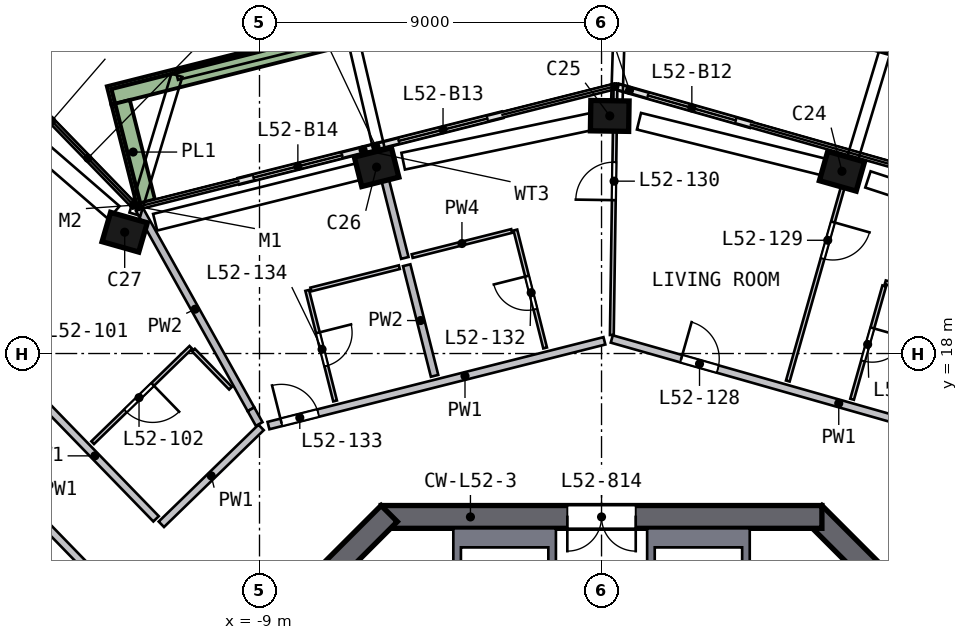
"""IFC4 building model, lengths in metres.
Left out: names, types, materials, properties, quantities, classifications, styles, units other than length and angle.
Written with IfcOpenShell. Run it as: python <this file> out.ifc"""

import sys

from ifc_helpers import new_model, si_unit, direction, frame, frame_2d, origin, origin_2d, place, context, subcontext, project, spatial, polyline, rectangle, outline, extrude, element, fill, save


model = new_model("IFC4")
c1 = context("Model", 3, precision=1e-05, world=origin(), true_north=direction((0.0, 1.0)))
c2 = subcontext(c1, "Body", "Model", "MODEL_VIEW")
j1 = project(units=[si_unit("LENGTHUNIT", "METRE"), si_unit("PLANEANGLEUNIT", "RADIAN")], contexts=[c1])
p1 = place(None, origin())
s1 = spatial("IfcSite", under=j1, at=p1, CompositionType="ELEMENT")
p2 = place(p1, origin())
s2 = spatial("IfcBuilding", under=s1, at=p2, CompositionType="ELEMENT")
p3 = place(p2, frame((0.0, 0.0, 212.5)))
s3 = spatial("IfcBuildingStorey", under=s2, at=p3, CompositionType="ELEMENT", Elevation=212.5)
p4 = place(p3, frame((6.458, 22.76, 0.0), z_axis=(-0.108518363, 0.029838507, 0.993646531), x_axis=(-0.955819005, 0.271559126, -0.112541864)))
e1 = element("IfcColumn", 1, at=p4, inside=s3, PredefinedType="COLUMN", context=c2, shape_type="SweptSolid", body=[
    extrude(rectangle(XDim=1.0, YDim=0.8, at=origin_2d()), origin(), (0.0, 0.0, 1.0), 3.019),
])
p5 = place(p3, frame((0.356, 24.252, 0.0), z_axis=(-0.115354293, 0.000727532, 0.993324145), x_axis=(0.993215879, -0.014697649, 0.115352485)))
e2 = element("IfcColumn", 2, at=p5, inside=s3, PredefinedType="COLUMN", context=c2, shape_type="SweptSolid", body=[
    extrude(rectangle(XDim=1.0, YDim=0.8, at=origin_2d()), origin(), (0.0, 0.0, 1.0), 3.02),
])
p6 = place(p3, frame((-5.788, 22.939, 0.0), z_axis=(-0.108842351, -0.028463973, 0.99365142), x_axis=(-0.96342149, -0.243234613, -0.112498691)))
e3 = element("IfcColumn", 3, at=p6, inside=s3, PredefinedType="COLUMN", context=c2, shape_type="SweptSolid", body=[
    extrude(rectangle(XDim=1.0, YDim=0.8, at=origin_2d()), origin(), (0.0, 0.0, 1.0), 3.019),
])
p7 = place(p3, frame((-12.426, 21.265, 0.0), z_axis=(-0.100621363, -0.059887895, 0.993120728), x_axis=(0.956942549, -0.278998029, 0.080131505)))
e4 = element("IfcColumn", 4, at=p7, inside=s3, PredefinedType="COLUMN", context=c2, shape_type="SweptSolid", body=[
    extrude(rectangle(XDim=1.0, YDim=0.8, at=origin_2d()), origin(), (0.0, 0.0, 1.0), 3.021),
])
p8 = place(p3, frame((13.788, 5.587, 0.0), z_axis=(0.0, 0.0, 1.0), x_axis=(-0.707106781, 0.707106781, 0.0)))
e5 = element("IfcWall", 5, at=p8, inside=s3, PredefinedType="SHEAR", context=c2, shape_type="SweptSolid", body=[
    extrude(rectangle(XDim=11.598, YDim=0.6, at=frame_2d((5.799, 0.0))), origin(), (0.0, 0.0, 1.0), 3.5),
])
p9 = place(p8, frame((2.099, 0.0, 0.0)))
e6 = element("IfcOpeningElement", 6, at=p9, cuts=e5, PredefinedType="OPENING", context=c2, shape_type="SweptSolid", body=[
    extrude(rectangle(XDim=1.2, YDim=2.1, at=frame_2d((0.6, 1.05))), frame((0.0, 0.31, 0.0), z_axis=(0.0, -1.0, 0.0), x_axis=(1.0, 0.0, 0.0)), (0.0, 0.0, 1.0), 0.62),
])
p10 = place(p3, frame((5.799, 13.7, 0.0), z_axis=(0.0, 0.0, 1.0), x_axis=(-1.0, 0.0, 0.0)))
e7 = element("IfcWall", 7, at=p10, inside=s3, PredefinedType="SHEAR", context=c2, shape_type="SweptSolid", body=[
    extrude(rectangle(XDim=11.598, YDim=0.6, at=frame_2d((5.799, 0.0))), origin(), (0.0, 0.0, 1.0), 3.5),
])
p11 = place(p10, frame((4.899, 0.0, 0.0)))
e8 = element("IfcOpeningElement", 8, at=p11, cuts=e7, PredefinedType="OPENING", context=c2, shape_type="SweptSolid", body=[
    extrude(rectangle(XDim=1.8, YDim=2.1, at=frame_2d((0.9, 1.05))), frame((0.0, 0.31, 0.0), z_axis=(0.0, -1.0, 0.0), x_axis=(1.0, 0.0, 0.0)), (0.0, 0.0, 1.0), 0.62),
])
p12 = place(p3, frame((-5.587, 13.788, 0.0), z_axis=(0.0, 0.0, 1.0), x_axis=(-0.707106781, -0.707106781, 0.0)))
e9 = element("IfcWall", 9, at=p12, inside=s3, PredefinedType="SHEAR", context=c2, shape_type="SweptSolid", body=[
    extrude(rectangle(XDim=11.598, YDim=0.6, at=frame_2d((5.799, 0.0))), origin(), (0.0, 0.0, 1.0), 3.5),
])
p13 = place(p3, frame((3.916, 24.027, 0.0), z_axis=(0.0, 0.0, 1.0), x_axis=(-0.96202019, 0.272978303, 0.0)))
e10 = element("IfcWall", 10, at=p13, inside=s3, PredefinedType="SOLIDWALL", context=c2, shape_type="SweptSolid", body=[
    extrude(rectangle(XDim=3.609, YDim=0.15, at=frame_2d((1.804, 0.0))), origin(), (0.0, 0.0, 1.0), 2.935),
])
p14 = place(p13, frame((0.4, 0.0, 0.0)))
e11 = element("IfcOpeningElement", 11, at=p14, cuts=e10, PredefinedType="OPENING", context=c2, shape_type="SweptSolid", body=[
    extrude(rectangle(XDim=2.4, YDim=2.4, at=frame_2d((1.2, 1.2))), frame((0.0, 0.085, 0.0), z_axis=(0.0, -1.0, 0.0), x_axis=(1.0, 0.0, 0.0)), (0.0, 0.0, 1.0), 0.17),
])
p15 = place(p3, frame((-2.619, 24.28, 0.0), z_axis=(0.0, 0.0, 1.0), x_axis=(-0.969612207, -0.244647026, 0.0)))
e12 = element("IfcWall", 12, at=p15, inside=s3, PredefinedType="SOLIDWALL", context=c2, shape_type="SweptSolid", body=[
    extrude(rectangle(XDim=3.4, YDim=0.15, at=frame_2d((1.7, 0.0))), origin(), (0.0, 0.0, 1.0), 2.935),
])
p16 = place(p15, frame((0.4, 0.0, 0.0)))
e13 = element("IfcOpeningElement", 13, at=p16, cuts=e12, PredefinedType="OPENING", context=c2, shape_type="SweptSolid", body=[
    extrude(rectangle(XDim=2.4, YDim=2.4, at=frame_2d((1.2, 1.2))), frame((0.0, 0.085, 0.0), z_axis=(0.0, -1.0, 0.0), x_axis=(1.0, 0.0, 0.0)), (0.0, 0.0, 1.0), 0.17),
])
p17 = place(p3, frame((-5.916, 23.448, 0.0), z_axis=(0.0, 0.0, 1.0), x_axis=(-0.969617968, -0.244624194, 0.0)))
e14 = element("IfcWall", 14, at=p17, inside=s3, PredefinedType="SOLIDWALL", context=c2, shape_type="SweptSolid", body=[
    extrude(rectangle(XDim=3.74, YDim=0.15, at=frame_2d((1.87, 0.0))), origin(), (0.0, 0.0, 1.0), 2.935),
])
p18 = place(p17, frame((0.94, 0.0, 0.0)))
e15 = element("IfcOpeningElement", 15, at=p18, cuts=e14, PredefinedType="OPENING", context=c2, shape_type="SweptSolid", body=[
    extrude(rectangle(XDim=2.4, YDim=2.4, at=frame_2d((1.2, 1.2))), frame((0.0, 0.085, 0.0), z_axis=(0.0, -1.0, 0.0), x_axis=(1.0, 0.0, 0.0)), (0.0, 0.0, 1.0), 0.17),
])
p19 = place(p3, frame((13.199, 24.537, 0.0), z_axis=(0.0, 0.0, 1.0), x_axis=(-0.962028122, 0.272950348, 0.0)))
e16 = element("IfcWall", 16, at=p19, inside=s3, PredefinedType="SOLIDWALL", context=c2, shape_type="SweptSolid", body=[
    extrude(rectangle(XDim=13.224, YDim=0.5, at=frame_2d((6.612, 0.0))), origin(), (0.0, 0.0, 1.0), 0.7),
])
p20 = place(p3, frame((0.348, 28.149, 0.0), z_axis=(0.0, 0.0, 1.0), x_axis=(-0.969615948, -0.244632202, 0.0)))
e17 = element("IfcWall", 17, at=p20, inside=s3, PredefinedType="SOLIDWALL", context=c2, shape_type="SweptSolid", body=[
    extrude(rectangle(XDim=13.723, YDim=0.5, at=frame_2d((6.862, 0.0))), origin(), (0.0, 0.0, 1.0), 0.7),
])
p21 = place(p3, frame((-12.655, 24.61, 0.0), z_axis=(0.0, 0.0, 1.0), x_axis=(0.244684701, -0.969602701, 0.0)))
e18 = element("IfcWall", 18, at=p21, inside=s3, PredefinedType="SOLIDWALL", context=c2, shape_type="SweptSolid", body=[
    extrude(rectangle(XDim=2.699, YDim=0.5, at=frame_2d((1.35, 0.0))), origin(), (0.0, 0.0, 1.0), 0.7),
])
p22 = place(p3, origin())
e19 = element("IfcWall", 19, at=p22, inside=s3, PredefinedType="SOLIDWALL", context=c2, shape_type="SweptSolid", body=[
    extrude(outline(polyline([(3.9, 9.9), (3.7, 9.9), (3.7, 12.9), (1.4, 12.9), (1.4, 9.9), (1.2, 9.9), (1.2, 13.4), (3.9, 13.4), (3.9, 9.9)])), origin(), (0.0, 0.0, 1.0), 3.0),
])
p23 = place(p3, origin())
e20 = element("IfcWall", 20, at=p23, inside=s3, PredefinedType="SOLIDWALL", context=c2, shape_type="SweptSolid", body=[
    extrude(outline(polyline([(-3.9, 13.4), (-1.2, 13.4), (-1.2, 9.9), (-1.4, 9.9), (-1.4, 12.9), (-3.7, 12.9), (-3.7, 9.9), (-3.9, 9.9), (-3.9, 13.4)])), origin(), (0.0, 0.0, 1.0), 3.0),
])
p24 = place(p3, frame((-13.3, 12.117, 0.0), z_axis=(0.0, 0.0, 1.0), x_axis=(-0.696664352, 0.717397226, 0.0)))
e21 = element("IfcWall", 21, at=p24, inside=s3, PredefinedType="SOLIDWALL", context=c2, shape_type="SweptSolid", body=[
    extrude(rectangle(XDim=9.821, YDim=0.2, at=frame_2d((4.91, 0.0))), origin(), (0.0, 0.0, 1.0), 3.0),
])
p25 = place(p24, frame((4.8, 0.0, 0.0)))
e22 = element("IfcOpeningElement", 22, at=p25, cuts=e21, PredefinedType="OPENING", context=c2, shape_type="SweptSolid", body=[
    extrude(rectangle(XDim=1.0, YDim=2.1, at=frame_2d((0.5, 1.05))), frame((0.0, 0.11, 0.0), z_axis=(0.0, -1.0, 0.0), x_axis=(1.0, 0.0, 0.0)), (0.0, 0.0, 1.0), 0.22),
])
p26 = place(p3, frame((-18.563, 20.695, 0.0), z_axis=(0.0, 0.0, 1.0), x_axis=(0.696664352, -0.717397226, 0.0)))
e23 = element("IfcWall", 23, at=p26, inside=s3, PredefinedType="SOLIDWALL", context=c2, shape_type="SweptSolid", body=[
    extrude(rectangle(XDim=9.821, YDim=0.2, at=frame_2d((4.91, 0.0))), origin(), (0.0, 0.0, 1.0), 3.0),
])
p27 = place(p26, frame((4.0, 0.0, 0.0)))
e24 = element("IfcOpeningElement", 24, at=p27, cuts=e23, PredefinedType="OPENING", context=c2, shape_type="SweptSolid", body=[
    extrude(rectangle(XDim=1.0, YDim=2.1, at=frame_2d((0.5, 1.05))), frame((0.0, 0.11, 0.0), z_axis=(0.0, -1.0, 0.0), x_axis=(1.0, 0.0, 0.0)), (0.0, 0.0, 1.0), 0.22),
])
p28 = place(p3, frame((-8.958, 16.055, 0.0), z_axis=(0.0, 0.0, 1.0), x_axis=(-0.717408019, -0.696653238, 0.0)))
e25 = element("IfcWall", 25, at=p28, inside=s3, PredefinedType="SOLIDWALL", context=c2, shape_type="SweptSolid", body=[
    extrude(rectangle(XDim=3.658, YDim=0.2, at=frame_2d((1.829, 0.0))), origin(), (0.0, 0.0, 1.0), 3.0),
])
p29 = place(p3, frame((-8.764, 16.104, 0.0), z_axis=(0.0, 0.0, 1.0), x_axis=(0.969617265, 0.244626981, 0.0)))
e26 = element("IfcWall", 26, at=p29, inside=s3, PredefinedType="SOLIDWALL", context=c2, shape_type="SweptSolid", body=[
    extrude(rectangle(XDim=9.117, YDim=0.2, at=frame_2d((4.559, 0.0))), origin(), (0.0, 0.0, 1.0), 3.0),
])
p30 = place(p29, frame((0.35, 0.0, 0.0)))
e27 = element("IfcOpeningElement", 27, at=p30, cuts=e26, PredefinedType="OPENING", context=c2, shape_type="SweptSolid", body=[
    extrude(rectangle(XDim=1.0, YDim=2.1, at=frame_2d((0.5, 1.05))), frame((0.0, 0.11, 0.0), z_axis=(0.0, -1.0, 0.0), x_axis=(1.0, 0.0, 0.0)), (0.0, 0.0, 1.0), 0.22),
])
p31 = place(p3, frame((0.27, 18.383, 0.0), z_axis=(0.0, 0.0, 1.0), x_axis=(0.96202861, -0.272948627, 0.0)))
e28 = element("IfcWall", 28, at=p31, inside=s3, PredefinedType="SOLIDWALL", context=c2, shape_type="SweptSolid", body=[
    extrude(rectangle(XDim=9.317, YDim=0.2, at=frame_2d((4.658, 0.0))), origin(), (0.0, 0.0, 1.0), 3.0),
])
p32 = place(p31, frame((1.9, 0.0, 0.0)))
e29 = element("IfcOpeningElement", 29, at=p32, cuts=e28, PredefinedType="OPENING", context=c2, shape_type="SweptSolid", body=[
    extrude(rectangle(XDim=1.0, YDim=2.1, at=frame_2d((0.5, 1.05))), frame((0.0, 0.11, 0.0), z_axis=(0.0, -1.0, 0.0), x_axis=(1.0, 0.0, 0.0)), (0.0, 0.0, 1.0), 0.22),
])
p33 = place(p3, frame((-12.164, 21.8, 0.0), z_axis=(0.0, 0.0, 1.0), x_axis=(0.487260658, -0.873256578, 0.0)))
e30 = element("IfcWall", 30, at=p33, inside=s3, PredefinedType="SOLIDWALL", context=c2, shape_type="SweptSolid", body=[
    extrude(rectangle(XDim=6.032, YDim=0.2, at=frame_2d((3.016, 0.0))), origin(), (0.0, 0.0, 1.0), 3.0),
])
p34 = place(p3, frame((-9.225, 16.533, 0.0), z_axis=(0.0, 0.0, 1.0), x_axis=(0.487229637, -0.873273887, 0.0)))
e31 = element("IfcWall", 31, at=p34, inside=s3, PredefinedType="SOLIDWALL", context=c2, shape_type="SweptSolid", body=[
    extrude(rectangle(XDim=0.444, YDim=0.2, at=frame_2d((0.222, 0.0))), origin(), (0.0, 0.0, 1.0), 3.0),
])
p35 = place(p3, frame((-5.176, 20.515, 0.0), z_axis=(0.0, 0.0, 1.0), x_axis=(-0.244638129, 0.969614452, 0.0)))
e32 = element("IfcWall", 32, at=p35, inside=s3, PredefinedType="SOLIDWALL", context=c2, shape_type="SweptSolid", body=[
    extrude(rectangle(XDim=2.95, YDim=0.2, at=frame_2d((1.475, 0.0))), origin(), (0.0, 0.0, 1.0), 3.0),
])
p36 = place(p3, frame((-4.393, 17.413, 0.0), z_axis=(0.0, 0.0, 1.0), x_axis=(-0.244544311, 0.969638118, 0.0)))
e33 = element("IfcWall", 33, at=p36, inside=s3, PredefinedType="SOLIDWALL", context=c2, shape_type="SweptSolid", body=[
    extrude(rectangle(XDim=3.002, YDim=0.2, at=frame_2d((1.501, 0.0))), origin(), (0.0, 0.0, 1.0), 3.0),
])
p37 = place(p3, frame((-10.807, 18.162, 0.0), z_axis=(0.0, 0.0, 1.0), x_axis=(-0.717440118, -0.696620181, 0.0)))
e34 = element("IfcWall", 34, at=p37, inside=s3, PredefinedType="PARTITIONING", context=c2, shape_type="SweptSolid", body=[
    extrude(rectangle(XDim=3.6, YDim=0.1, at=frame_2d((1.8, 0.0))), origin(), (0.0, 0.0, 1.0), 3.0),
])
p38 = place(p37, frame((1.4, 0.0, 0.0)))
e35 = element("IfcOpeningElement", 35, at=p38, cuts=e34, PredefinedType="OPENING", context=c2, shape_type="SweptSolid", body=[
    extrude(rectangle(XDim=1.0, YDim=2.1, at=frame_2d((0.5, 1.05))), frame((0.0, 0.06, 0.0), z_axis=(0.0, -1.0, 0.0), x_axis=(1.0, 0.0, 0.0)), (0.0, 0.0, 1.0), 0.12),
])
p39 = place(p3, frame((-10.737, 18.09, 0.0), z_axis=(0.0, 0.0, 1.0), x_axis=(0.696731792, -0.71733173, 0.0)))
e36 = element("IfcWall", 36, at=p39, inside=s3, PredefinedType="PARTITIONING", context=c2, shape_type="SweptSolid", body=[
    extrude(rectangle(XDim=1.398, YDim=0.1, at=frame_2d((0.699, 0.0))), origin(), (0.0, 0.0, 1.0), 3.0),
])
p40 = place(p3, frame((-7.745, 19.661, 0.0), z_axis=(0.0, 0.0, 1.0), x_axis=(0.244717984, -0.969594301, 0.0)))
e37 = element("IfcWall", 37, at=p40, inside=s3, PredefinedType="PARTITIONING", context=c2, shape_type="SweptSolid", body=[
    extrude(rectangle(XDim=3.0, YDim=0.1, at=frame_2d((1.5, 0.0))), origin(), (0.0, 0.0, 1.0), 3.0),
])
p41 = place(p40, frame((1.15, 0.0, 0.0)))
e38 = element("IfcOpeningElement", 38, at=p41, cuts=e37, PredefinedType="OPENING", context=c2, shape_type="SweptSolid", body=[
    extrude(rectangle(XDim=0.9, YDim=2.1, at=frame_2d((0.45, 1.05))), frame((0.0, 0.06, 0.0), z_axis=(0.0, -1.0, 0.0), x_axis=(1.0, 0.0, 0.0)), (0.0, 0.0, 1.0), 0.12),
])
p42 = place(p3, frame((-7.648, 19.686, 0.0), z_axis=(0.0, 0.0, 1.0), x_axis=(0.969607564, 0.244665428, 0.0)))
e39 = element("IfcWall", 39, at=p42, inside=s3, PredefinedType="PARTITIONING", context=c2, shape_type="SweptSolid", body=[
    extrude(rectangle(XDim=2.4, YDim=0.1, at=frame_2d((1.2, 0.0))), origin(), (0.0, 0.0, 1.0), 3.0),
])
p43 = place(p3, frame((-2.364, 21.225, 0.0), z_axis=(0.0, 0.0, 1.0), x_axis=(-0.969629761, -0.244577444, 0.0)))
e40 = element("IfcWall", 40, at=p43, inside=s3, PredefinedType="PARTITIONING", context=c2, shape_type="SweptSolid", body=[
    extrude(rectangle(XDim=2.7, YDim=0.1, at=frame_2d((1.35, 0.0))), origin(), (0.0, 0.0, 1.0), 3.0),
])
p44 = place(p3, frame((-1.484, 18.146, 0.0), z_axis=(0.0, 0.0, 1.0), x_axis=(-0.244581416, 0.969628759, 0.0)))
e41 = element("IfcWall", 41, at=p44, inside=s3, PredefinedType="PARTITIONING", context=c2, shape_type="SweptSolid", body=[
    extrude(rectangle(XDim=3.2, YDim=0.1, at=frame_2d((1.6, 0.0))), origin(), (0.0, 0.0, 1.0), 3.0),
])
p45 = place(p44, frame((1.05, 0.0, 0.0)))
e42 = element("IfcOpeningElement", 42, at=p45, cuts=e41, PredefinedType="OPENING", context=c2, shape_type="SweptSolid", body=[
    extrude(rectangle(XDim=0.9, YDim=2.1, at=frame_2d((0.45, 1.05))), frame((0.0, 0.06, 0.0), z_axis=(0.0, -1.0, 0.0), x_axis=(1.0, 0.0, 0.0)), (0.0, 0.0, 1.0), 0.12),
])
p46 = place(p3, frame((0.271, 18.486, 0.0), z_axis=(0.0, 0.0, 1.0), x_axis=(0.014665491, 0.999892456, 0.0)))
e43 = element("IfcWall", 43, at=p46, inside=s3, PredefinedType="PARTITIONING", context=c2, shape_type="SweptSolid", body=[
    extrude(rectangle(XDim=6.476, YDim=0.1, at=frame_2d((3.238, 0.0))), origin(), (0.0, 0.0, 1.0), 3.0),
])
p47 = place(p46, frame((3.55, 0.0, 0.0)))
e44 = element("IfcOpeningElement", 44, at=p47, cuts=e43, PredefinedType="OPENING", context=c2, shape_type="SweptSolid", body=[
    extrude(rectangle(XDim=1.0, YDim=2.1, at=frame_2d((0.5, 1.05))), frame((0.0, 0.06, 0.0), z_axis=(0.0, -1.0, 0.0), x_axis=(1.0, 0.0, 0.0)), (0.0, 0.0, 1.0), 0.12),
])
p48 = place(p3, frame((6.58, 23.193, 0.0), z_axis=(0.0, 0.0, 1.0), x_axis=(-0.272922263, -0.96203609, 0.0)))
e45 = element("IfcWall", 45, at=p48, inside=s3, PredefinedType="PARTITIONING", context=c2, shape_type="SweptSolid", body=[
    extrude(rectangle(XDim=6.15, YDim=0.1, at=frame_2d((3.075, 0.0))), origin(), (0.0, 0.0, 1.0), 3.0),
])
p49 = place(p48, frame((1.8, 0.0, 0.0)))
e46 = element("IfcOpeningElement", 46, at=p49, cuts=e45, PredefinedType="OPENING", context=c2, shape_type="SweptSolid", body=[
    extrude(rectangle(XDim=1.0, YDim=2.1, at=frame_2d((0.5, 1.05))), frame((0.0, 0.06, 0.0), z_axis=(0.0, -1.0, 0.0), x_axis=(1.0, 0.0, 0.0)), (0.0, 0.0, 1.0), 0.12),
])
p50 = place(p3, frame((7.439, 19.779, 0.0), z_axis=(0.0, 0.0, 1.0), x_axis=(-0.272952471, -0.96202752, 0.0)))
e47 = element("IfcWall", 47, at=p50, inside=s3, PredefinedType="PARTITIONING", context=c2, shape_type="SweptSolid", body=[
    extrude(rectangle(XDim=3.1, YDim=0.1, at=frame_2d((1.55, 0.0))), origin(), (0.0, 0.0, 1.0), 3.0),
])
p51 = place(p50, frame((1.15, 0.0, 0.0)))
e48 = element("IfcOpeningElement", 48, at=p51, cuts=e47, PredefinedType="OPENING", context=c2, shape_type="SweptSolid", body=[
    extrude(rectangle(XDim=0.9, YDim=2.1, at=frame_2d((0.45, 1.05))), frame((0.0, 0.06, 0.0), z_axis=(0.0, -1.0, 0.0), x_axis=(1.0, 0.0, 0.0)), (0.0, 0.0, 1.0), 0.12),
])
p52 = place(p3, frame((11.03, 18.864, 0.0), z_axis=(0.0, 0.0, 1.0), x_axis=(-0.962027256, 0.2729534, 0.0)))
e49 = element("IfcWall", 49, at=p52, inside=s3, PredefinedType="PARTITIONING", context=c2, shape_type="SweptSolid", body=[
    extrude(rectangle(XDim=3.704, YDim=0.1, at=frame_2d((1.852, 0.0))), origin(), (0.0, 0.0, 1.0), 3.0),
])
p53 = place(p14, origin())
e50 = element("IfcDoor", 50, at=p53, inside=s3, OperationType="SLIDING_TO_RIGHT", PredefinedType="DOOR", context=c2, shape_type="SweptSolid", body=[
    extrude(rectangle(XDim=2.4, YDim=2.4, at=frame_2d((1.2, 1.2))), frame((0.0, 0.025, 0.0), z_axis=(0.0, -1.0, 0.0), x_axis=(1.0, 0.0, 0.0)), (0.0, 0.0, 1.0), 0.05),
])
fill(e11, e50)
p54 = place(p16, origin())
e51 = element("IfcDoor", 51, at=p54, inside=s3, OperationType="SLIDING_TO_RIGHT", PredefinedType="DOOR", context=c2, shape_type="SweptSolid", body=[
    extrude(rectangle(XDim=2.4, YDim=2.4, at=frame_2d((1.2, 1.2))), frame((0.0, 0.025, 0.0), z_axis=(0.0, -1.0, 0.0), x_axis=(1.0, 0.0, 0.0)), (0.0, 0.0, 1.0), 0.05),
])
fill(e13, e51)
p55 = place(p18, origin())
e52 = element("IfcDoor", 52, at=p55, inside=s3, OperationType="SLIDING_TO_LEFT", PredefinedType="DOOR", context=c2, shape_type="SweptSolid", body=[
    extrude(rectangle(XDim=2.4, YDim=2.4, at=frame_2d((1.2, 1.2))), frame((0.0, 0.025, 0.0), z_axis=(0.0, -1.0, 0.0), x_axis=(1.0, 0.0, 0.0)), (0.0, 0.0, 1.0), 0.05),
])
fill(e15, e52)
p56 = place(p11, origin())
e53 = element("IfcDoor", 53, at=p56, inside=s3, OperationType="DOUBLE_DOOR_SINGLE_SWING", PredefinedType="DOOR", context=c2, shape_type="SweptSolid", body=[
    extrude(rectangle(XDim=1.8, YDim=2.1, at=frame_2d((0.9, 1.05))), frame((0.0, 0.025, 0.0), z_axis=(0.0, -1.0, 0.0), x_axis=(1.0, 0.0, 0.0)), (0.0, 0.0, 1.0), 0.05),
])
fill(e8, e53)
p57 = place(p38, origin())
e54 = element("IfcDoor", 54, at=p57, inside=s3, OperationType="SINGLE_SWING_LEFT", PredefinedType="DOOR", context=c2, shape_type="SweptSolid", body=[
    extrude(rectangle(XDim=1.0, YDim=2.1, at=frame_2d((0.5, 1.05))), frame((0.0, 0.025, 0.0), z_axis=(0.0, -1.0, 0.0), x_axis=(1.0, 0.0, 0.0)), (0.0, 0.0, 1.0), 0.05),
])
fill(e35, e54)
p58 = place(p32, origin())
e55 = element("IfcDoor", 55, at=p58, inside=s3, OperationType="SINGLE_SWING_LEFT", PredefinedType="DOOR", context=c2, shape_type="SweptSolid", body=[
    extrude(rectangle(XDim=1.0, YDim=2.1, at=frame_2d((0.5, 1.05))), frame((0.0, 0.025, 0.0), z_axis=(0.0, -1.0, 0.0), x_axis=(1.0, 0.0, 0.0)), (0.0, 0.0, 1.0), 0.05),
])
fill(e29, e55)
p59 = place(p49, origin())
e56 = element("IfcDoor", 56, at=p59, inside=s3, OperationType="SINGLE_SWING_LEFT", PredefinedType="DOOR", context=c2, shape_type="SweptSolid", body=[
    extrude(rectangle(XDim=1.0, YDim=2.1, at=frame_2d((0.5, 1.05))), frame((0.0, 0.025, 0.0), z_axis=(0.0, -1.0, 0.0), x_axis=(1.0, 0.0, 0.0)), (0.0, 0.0, 1.0), 0.05),
])
fill(e46, e56)
p60 = place(p47, origin())
e57 = element("IfcDoor", 57, at=p60, inside=s3, OperationType="SINGLE_SWING_LEFT", PredefinedType="DOOR", context=c2, shape_type="SweptSolid", body=[
    extrude(rectangle(XDim=1.0, YDim=2.1, at=frame_2d((0.5, 1.05))), frame((0.0, 0.025, 0.0), z_axis=(0.0, -1.0, 0.0), x_axis=(1.0, 0.0, 0.0)), (0.0, 0.0, 1.0), 0.05),
])
fill(e44, e57)
p61 = place(p51, origin())
e58 = element("IfcDoor", 58, at=p61, inside=s3, OperationType="SINGLE_SWING_LEFT", PredefinedType="DOOR", context=c2, shape_type="SweptSolid", body=[
    extrude(rectangle(XDim=0.9, YDim=2.1, at=frame_2d((0.45, 1.05))), frame((0.0, 0.025, 0.0), z_axis=(0.0, -1.0, 0.0), x_axis=(1.0, 0.0, 0.0)), (0.0, 0.0, 1.0), 0.05),
])
fill(e48, e58)
p62 = place(p45, origin())
e59 = element("IfcDoor", 59, at=p62, inside=s3, OperationType="SINGLE_SWING_RIGHT", PredefinedType="DOOR", context=c2, shape_type="SweptSolid", body=[
    extrude(rectangle(XDim=0.9, YDim=2.1, at=frame_2d((0.45, 1.05))), frame((0.0, 0.025, 0.0), z_axis=(0.0, -1.0, 0.0), x_axis=(1.0, 0.0, 0.0)), (0.0, 0.0, 1.0), 0.05),
])
fill(e42, e59)
p63 = place(p30, origin())
e60 = element("IfcDoor", 60, at=p63, inside=s3, OperationType="SINGLE_SWING_LEFT", PredefinedType="DOOR", context=c2, shape_type="SweptSolid", body=[
    extrude(rectangle(XDim=1.0, YDim=2.1, at=frame_2d((0.5, 1.05))), frame((0.0, 0.025, 0.0), z_axis=(0.0, -1.0, 0.0), x_axis=(1.0, 0.0, 0.0)), (0.0, 0.0, 1.0), 0.05),
])
fill(e27, e60)
p64 = place(p41, origin())
e61 = element("IfcDoor", 61, at=p64, inside=s3, OperationType="SINGLE_SWING_LEFT", PredefinedType="DOOR", context=c2, shape_type="SweptSolid", body=[
    extrude(rectangle(XDim=0.9, YDim=2.1, at=frame_2d((0.45, 1.05))), frame((0.0, 0.025, 0.0), z_axis=(0.0, -1.0, 0.0), x_axis=(1.0, 0.0, 0.0)), (0.0, 0.0, 1.0), 0.05),
])
fill(e38, e61)
save(model, sys.argv[1])
